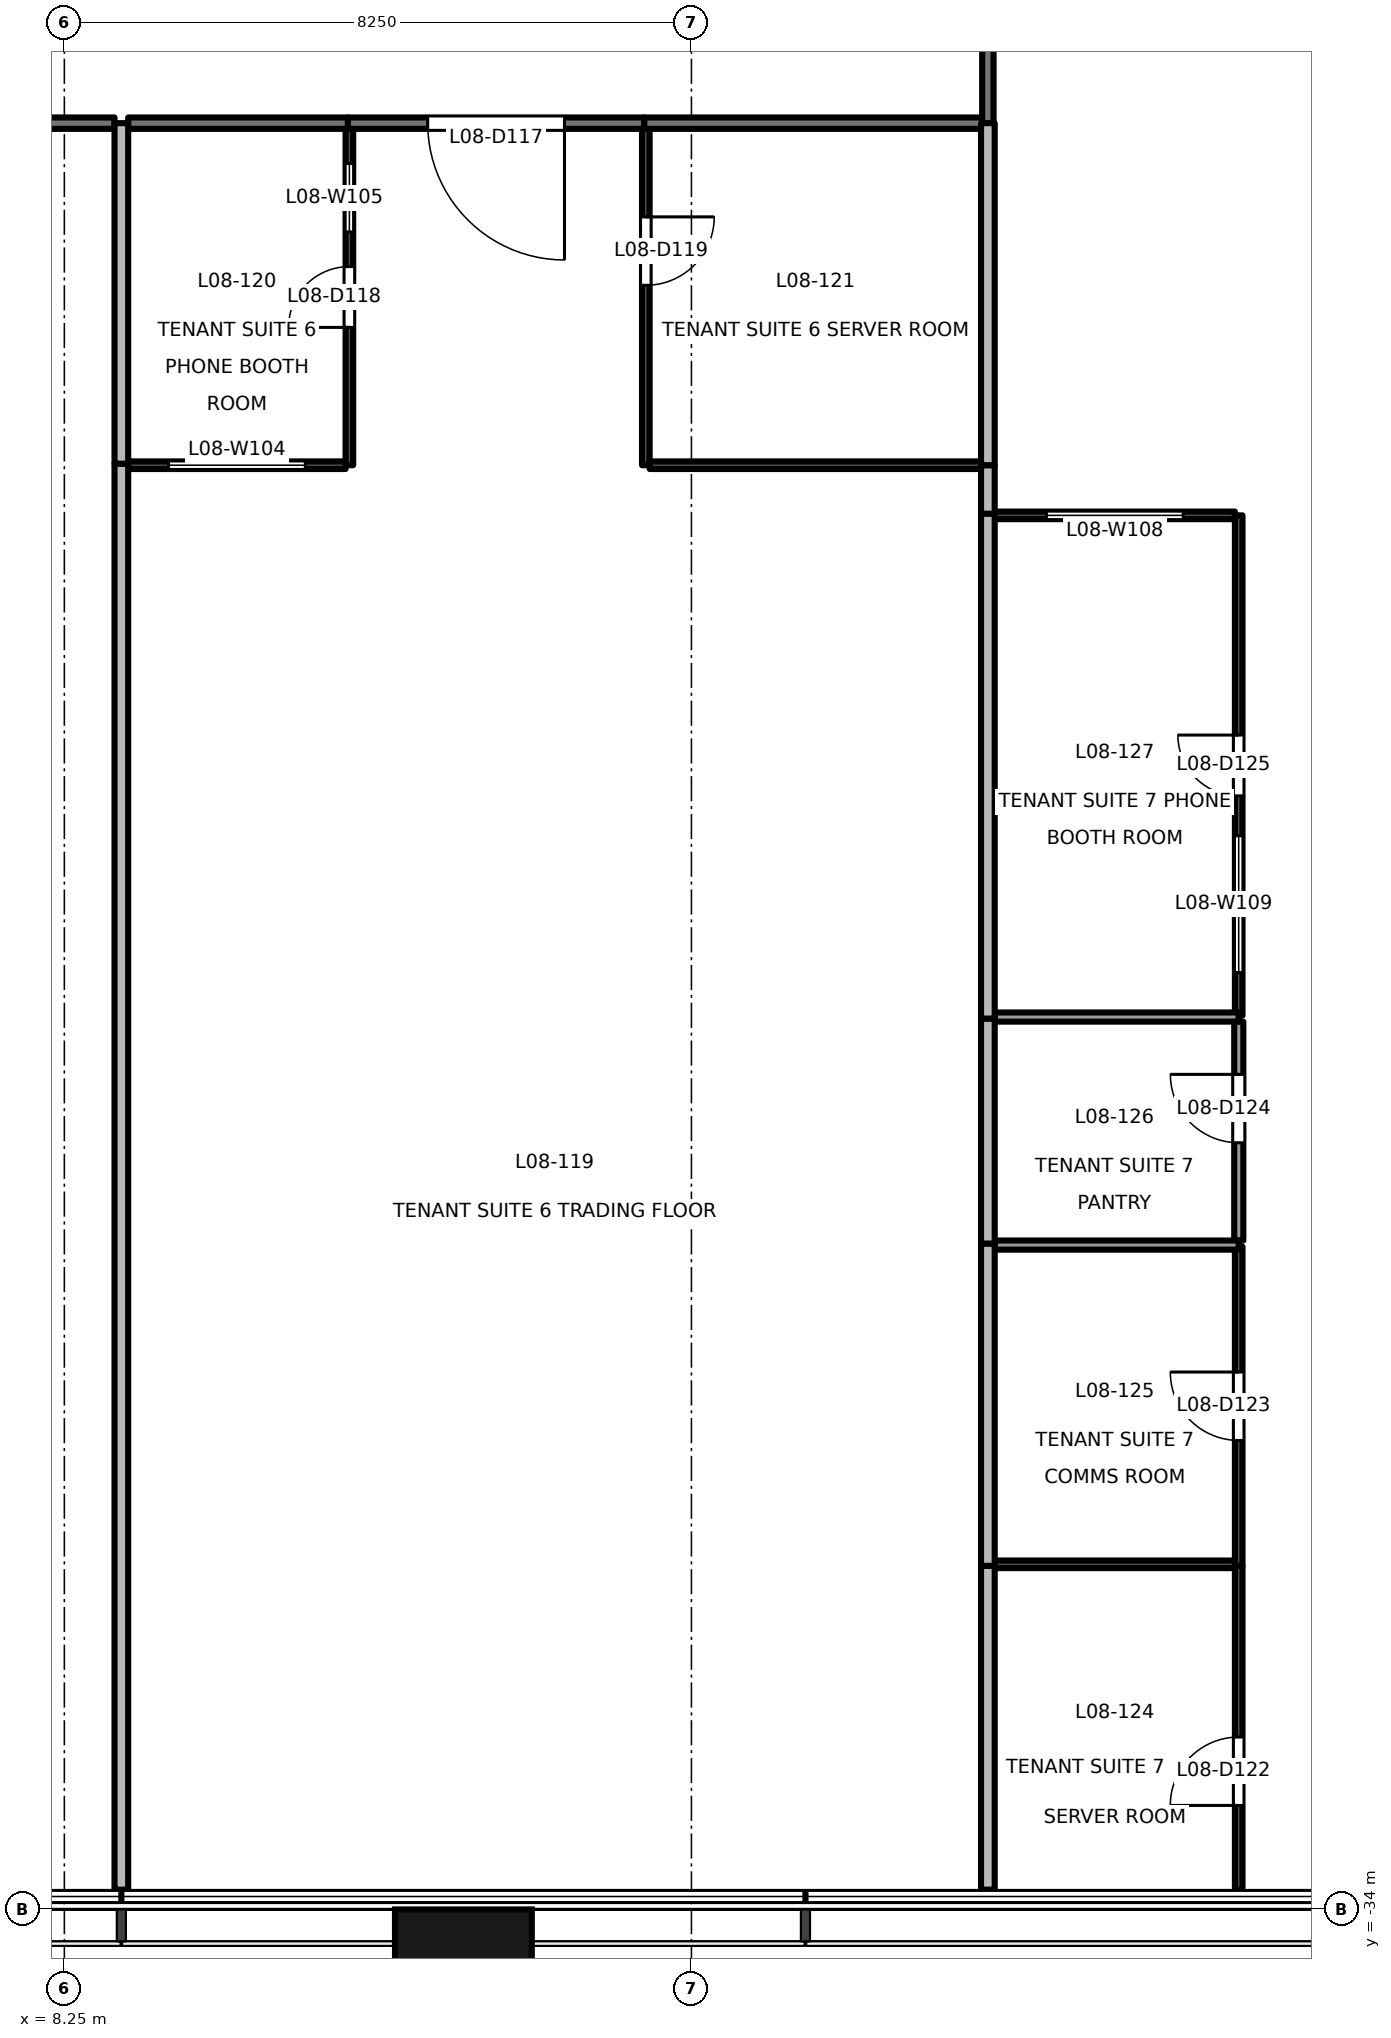
"""IFC4 building model, lengths in metres.
Left out: names, types, materials, properties, quantities, classifications, styles, units other than length and angle.
Written with IfcOpenShell. Run it as: python <this file> out.ifc"""

import sys

from ifc_helpers import new_model, si_unit, direction, frame, frame_2d, origin, origin_2d, place, context, subcontext, project, spatial, rectangle, extrude, element, fill, save


model = new_model("IFC4")
c1 = context("Model", 3, precision=1e-05, world=origin(), true_north=direction((0.0, 1.0)))
c2 = subcontext(c1, "Body", "Model", "MODEL_VIEW")
j1 = project(units=[si_unit("LENGTHUNIT", "METRE"), si_unit("PLANEANGLEUNIT", "RADIAN")], contexts=[c1])
p1 = place(None, origin())
s1 = spatial("IfcSite", under=j1, at=p1, CompositionType="ELEMENT")
p2 = place(p1, origin())
s2 = spatial("IfcBuilding", under=s1, at=p2, CompositionType="ELEMENT")
p3 = place(p2, frame((0.0, 0.0, 40.6)))
s3 = spatial("IfcBuildingStorey", under=s2, at=p3, CompositionType="ELEMENT", Elevation=40.6)
p4 = place(p3, frame((13.5, -34.9, -0.2), z_axis=(0.0, 0.0, 1.0), x_axis=(1.0, 0.0, 0.0)))
e1 = element("IfcColumn", 1, at=p4, inside=s3, PredefinedType="COLUMN", context=c2, shape_type="SweptSolid", body=[
    extrude(rectangle(XDim=1.8, YDim=1.8, at=origin_2d()), origin(), (0.0, 0.0, 1.0), 4.1),
])
p5 = place(p3, frame((8.91, -10.5, 0.0), z_axis=(0.0, 0.0, 1.0), x_axis=(-1.0, 0.0, 0.0)))
e2 = element("IfcWall", 2, at=p5, inside=s3, PredefinedType="PARTITIONING", context=c2, shape_type="SweptSolid", body=[
    extrude(rectangle(XDim=5.93, YDim=0.15, at=frame_2d((2.965, 0.0))), origin(), (0.0, 0.0, 1.0), 2.9),
])
p6 = place(p5, frame((3.197, 0.0, 0.0)))
e3 = element("IfcOpeningElement", 3, at=p6, cuts=e2, PredefinedType="OPENING", context=c2, shape_type="SweptSolid", body=[
    extrude(rectangle(XDim=1.5, YDim=2.1, at=frame_2d((0.75, 1.05))), frame((0.0, 0.085, 0.0), z_axis=(0.0, -1.0, 0.0), x_axis=(1.0, 0.0, 0.0)), (0.0, 0.0, 1.0), 0.171),
])
p7 = place(p3, frame((15.88, -10.5, 0.0), z_axis=(0.0, 0.0, 1.0), x_axis=(-1.0, 0.0, 0.0)))
e4 = element("IfcWall", 4, at=p7, inside=s3, PredefinedType="PARTITIONING", context=c2, shape_type="SweptSolid", body=[
    extrude(rectangle(XDim=3.9, YDim=0.15, at=frame_2d((1.95, 0.0))), origin(), (0.0, 0.0, 1.0), 2.9),
])
p8 = place(p7, frame((1.05, 0.0, 0.0)))
e5 = element("IfcOpeningElement", 5, at=p8, cuts=e4, PredefinedType="OPENING", context=c2, shape_type="SweptSolid", body=[
    extrude(rectangle(XDim=1.8, YDim=2.1, at=frame_2d((0.9, 1.05))), frame((0.0, 0.085, 0.0), z_axis=(0.0, -1.0, 0.0), x_axis=(1.0, 0.0, 0.0)), (0.0, 0.0, 1.0), 0.171),
])
p9 = place(p3, frame((11.98, -10.5, 0.0), z_axis=(0.0, 0.0, 1.0), x_axis=(-1.0, 0.0, 0.0)))
e6 = element("IfcWall", 6, at=p9, inside=s3, PredefinedType="PARTITIONING", context=c2, shape_type="SweptSolid", body=[
    extrude(rectangle(XDim=2.89, YDim=0.15, at=frame_2d((1.445, 0.0))), origin(), (0.0, 0.0, 1.0), 2.9),
])
p10 = place(p3, frame((20.325, -10.5, 0.0), z_axis=(0.0, 0.0, 1.0), x_axis=(-1.0, 0.0, 0.0)))
e7 = element("IfcWall", 7, at=p10, inside=s3, PredefinedType="PARTITIONING", context=c2, shape_type="SweptSolid", body=[
    extrude(rectangle(XDim=4.445, YDim=0.15, at=frame_2d((2.223, 0.0))), origin(), (0.0, 0.0, 1.0), 2.5),
])
p11 = place(p3, frame((20.4, -4.817, 0.0), z_axis=(0.0, 0.0, 1.0), x_axis=(0.0, -1.0, 0.0)))
e8 = element("IfcWall", 8, at=p11, inside=s3, PredefinedType="PARTITIONING", context=c2, shape_type="SweptSolid", body=[
    extrude(rectangle(XDim=5.683, YDim=0.15, at=frame_2d((2.842, 0.0))), origin(), (0.0, 0.0, 1.0), 3.3),
])
p12 = place(p11, frame((1.942, 0.0, 0.0)))
e9 = element("IfcOpeningElement", 9, at=p12, cuts=e8, PredefinedType="OPENING", context=c2, shape_type="SweptSolid", body=[
    extrude(rectangle(XDim=1.8, YDim=2.1, at=frame_2d((0.9, 1.05))), frame((0.0, 0.085, 0.0), z_axis=(0.0, -1.0, 0.0), x_axis=(1.0, 0.0, 0.0)), (0.0, 0.0, 1.0), 0.171),
])
p13 = place(p3, frame((9.0, -14.98, 0.0), z_axis=(0.0, 0.0, 1.0), x_axis=(0.0, -1.0, 0.0)))
e10 = element("IfcWall", 10, at=p13, inside=s3, PredefinedType="PARTITIONING", context=c2, shape_type="SweptSolid", body=[
    extrude(rectangle(XDim=18.76, YDim=0.18, at=frame_2d((9.38, 0.0))), origin(), (0.0, 0.0, 1.0), 2.9),
])
p14 = place(p3, frame((9.0, -10.5, 0.0), z_axis=(0.0, 0.0, 1.0), x_axis=(0.0, -1.0, 0.0)))
e11 = element("IfcWall", 11, at=p14, inside=s3, PredefinedType="PARTITIONING", context=c2, shape_type="SweptSolid", body=[
    extrude(rectangle(XDim=4.48, YDim=0.18, at=frame_2d((2.24, 0.0))), origin(), (0.0, 0.0, 1.0), 2.9),
])
p15 = place(p3, frame((9.09, -15.0, 0.0), z_axis=(0.0, 0.0, 1.0), x_axis=(1.0, 0.0, 0.0)))
e12 = element("IfcWall", 12, at=p15, inside=s3, PredefinedType="PARTITIONING", context=c2, shape_type="SweptSolid", body=[
    extrude(rectangle(XDim=2.86, YDim=0.1, at=frame_2d((1.43, 0.0))), origin(), (0.0, 0.0, 1.0), 2.9),
])
p16 = place(p15, frame((0.53, 0.0, 0.9)))
e13 = element("IfcOpeningElement", 13, at=p16, cuts=e12, PredefinedType="OPENING", context=c2, shape_type="SweptSolid", body=[
    extrude(rectangle(XDim=1.8, YDim=1.2, at=frame_2d((0.9, 0.6))), frame((0.0, 0.061, 0.0), z_axis=(0.0, -1.0, 0.0), x_axis=(1.0, 0.0, 0.0)), (0.0, 0.0, 1.0), 0.121),
])
p17 = place(p3, frame((12.0, -15.0, 0.0), z_axis=(0.0, 0.0, 1.0), x_axis=(0.0, 1.0, 0.0)))
e14 = element("IfcWall", 14, at=p17, inside=s3, PredefinedType="PARTITIONING", context=c2, shape_type="SweptSolid", body=[
    extrude(rectangle(XDim=4.425, YDim=0.1, at=frame_2d((2.212, 0.0))), origin(), (0.0, 0.0, 1.0), 3.9),
])
p18 = place(p17, frame((1.813, 0.0, 0.0)))
e15 = element("IfcOpeningElement", 15, at=p18, cuts=e14, PredefinedType="OPENING", context=c2, shape_type="SweptSolid", body=[
    extrude(rectangle(XDim=0.8, YDim=2.1, at=frame_2d((0.4, 1.05))), frame((0.0, 0.061, 0.0), z_axis=(0.0, -1.0, 0.0), x_axis=(1.0, 0.0, 0.0)), (0.0, 0.0, 1.0), 0.121),
])
p19 = place(p17, frame((3.069, 0.0, 0.9)))
e16 = element("IfcOpeningElement", 16, at=p19, cuts=e14, PredefinedType="OPENING", context=c2, shape_type="SweptSolid", body=[
    extrude(rectangle(XDim=0.9, YDim=1.2, at=frame_2d((0.45, 0.6))), frame((0.0, 0.061, 0.0), z_axis=(0.0, -1.0, 0.0), x_axis=(1.0, 0.0, 0.0)), (0.0, 0.0, 1.0), 0.121),
])
p20 = place(p3, frame((15.9, -10.575, 0.0), z_axis=(0.0, 0.0, 1.0), x_axis=(0.0, -1.0, 0.0)))
e17 = element("IfcWall", 17, at=p20, inside=s3, PredefinedType="PARTITIONING", context=c2, shape_type="SweptSolid", body=[
    extrude(rectangle(XDim=4.425, YDim=0.1, at=frame_2d((2.212, 0.0))), origin(), (0.0, 0.0, 1.0), 3.9),
])
p21 = place(p20, frame((1.158, 0.0, 0.0)))
e18 = element("IfcOpeningElement", 18, at=p21, cuts=e17, PredefinedType="OPENING", context=c2, shape_type="SweptSolid", body=[
    extrude(rectangle(XDim=0.9, YDim=2.1, at=frame_2d((0.45, 1.05))), frame((0.0, 0.061, 0.0), z_axis=(0.0, -1.0, 0.0), x_axis=(1.0, 0.0, 0.0)), (0.0, 0.0, 1.0), 0.121),
])
p22 = place(p3, frame((15.95, -15.0, 0.0), z_axis=(0.0, 0.0, 1.0), x_axis=(1.0, 0.0, 0.0)))
e19 = element("IfcWall", 19, at=p22, inside=s3, PredefinedType="PARTITIONING", context=c2, shape_type="SweptSolid", body=[
    extrude(rectangle(XDim=4.36, YDim=0.1, at=frame_2d((2.18, 0.0))), origin(), (0.0, 0.0, 1.0), 2.5),
])
p23 = place(p3, frame((20.4, -15.0, 0.0), z_axis=(0.0, 0.0, 1.0), x_axis=(0.0, -1.0, 0.0)))
e20 = element("IfcWall", 20, at=p23, inside=s3, PredefinedType="PARTITIONING", context=c2, shape_type="SweptSolid", body=[
    extrude(rectangle(XDim=0.64, YDim=0.18, at=frame_2d((0.32, 0.0))), origin(), (0.0, 0.0, 1.0), 3.9),
])
p24 = place(p3, frame((20.4, -29.48, 0.0), z_axis=(0.0, 0.0, 1.0), x_axis=(0.0, -1.0, 0.0)))
e21 = element("IfcWall", 21, at=p24, inside=s3, PredefinedType="PARTITIONING", context=c2, shape_type="SweptSolid", body=[
    extrude(rectangle(XDim=4.26, YDim=0.18, at=frame_2d((2.13, 0.0))), origin(), (0.0, 0.0, 1.0), 3.9),
])
p25 = place(p3, frame((20.4, -25.24, 0.0), z_axis=(0.0, 0.0, 1.0), x_axis=(0.0, -1.0, 0.0)))
e22 = element("IfcWall", 22, at=p25, inside=s3, PredefinedType="PARTITIONING", context=c2, shape_type="SweptSolid", body=[
    extrude(rectangle(XDim=4.24, YDim=0.18, at=frame_2d((2.12, 0.0))), origin(), (0.0, 0.0, 1.0), 3.3),
])
p26 = place(p3, frame((20.4, -22.28, 0.0), z_axis=(0.0, 0.0, 1.0), x_axis=(0.0, -1.0, 0.0)))
e23 = element("IfcWall", 23, at=p26, inside=s3, PredefinedType="PARTITIONING", context=c2, shape_type="SweptSolid", body=[
    extrude(rectangle(XDim=2.96, YDim=0.18, at=frame_2d((1.48, 0.0))), origin(), (0.0, 0.0, 1.0), 3.3),
])
p27 = place(p3, frame((20.4, -15.64, 0.0), z_axis=(0.0, 0.0, 1.0), x_axis=(0.0, -1.0, 0.0)))
e24 = element("IfcWall", 24, at=p27, inside=s3, PredefinedType="PARTITIONING", context=c2, shape_type="SweptSolid", body=[
    extrude(rectangle(XDim=6.64, YDim=0.18, at=frame_2d((3.32, 0.0))), origin(), (0.0, 0.0, 1.0), 3.3),
])
p28 = place(p3, frame((20.4, -10.5, 0.0), z_axis=(0.0, 0.0, 1.0), x_axis=(0.0, -1.0, 0.0)))
e25 = element("IfcWall", 25, at=p28, inside=s3, PredefinedType="PARTITIONING", context=c2, shape_type="SweptSolid", body=[
    extrude(rectangle(XDim=4.5, YDim=0.18, at=frame_2d((2.25, 0.0))), origin(), (0.0, 0.0, 1.0), 3.3),
])
p29 = place(p3, frame((23.7, -33.74, 0.0), z_axis=(0.0, 0.0, 1.0), x_axis=(0.0, 1.0, 0.0)))
e26 = element("IfcWall", 26, at=p29, inside=s3, PredefinedType="PARTITIONING", context=c2, shape_type="SweptSolid", body=[
    extrude(rectangle(XDim=4.26, YDim=0.1, at=frame_2d((2.13, 0.0))), origin(), (0.0, 0.0, 1.0), 3.9),
])
p30 = place(p29, frame((1.108, 0.0, 0.0)))
e27 = element("IfcOpeningElement", 27, at=p30, cuts=e26, PredefinedType="OPENING", context=c2, shape_type="SweptSolid", body=[
    extrude(rectangle(XDim=0.9, YDim=2.1, at=frame_2d((0.45, 1.05))), frame((0.0, 0.061, 0.0), z_axis=(0.0, -1.0, 0.0), x_axis=(1.0, 0.0, 0.0)), (0.0, 0.0, 1.0), 0.121),
])
p31 = place(p3, frame((23.7, -29.48, 0.0), z_axis=(0.0, 0.0, 1.0), x_axis=(0.0, 1.0, 0.0)))
e28 = element("IfcWall", 28, at=p31, inside=s3, PredefinedType="PARTITIONING", context=c2, shape_type="SweptSolid", body=[
    extrude(rectangle(XDim=4.2, YDim=0.1, at=frame_2d((2.1, 0.0))), origin(), (0.0, 0.0, 1.0), 3.3),
])
p32 = place(p31, frame((1.65, 0.0, 0.0)))
e29 = element("IfcOpeningElement", 29, at=p32, cuts=e28, PredefinedType="OPENING", context=c2, shape_type="SweptSolid", body=[
    extrude(rectangle(XDim=0.9, YDim=2.1, at=frame_2d((0.45, 1.05))), frame((0.0, 0.061, 0.0), z_axis=(0.0, -1.0, 0.0), x_axis=(1.0, 0.0, 0.0)), (0.0, 0.0, 1.0), 0.121),
])
p33 = place(p3, frame((23.701, -25.2, 0.0), z_axis=(0.0, 0.0, 1.0), x_axis=(0.0, 1.0, 0.0)))
e30 = element("IfcWall", 30, at=p33, inside=s3, PredefinedType="PARTITIONING", context=c2, shape_type="SweptSolid", body=[
    extrude(rectangle(XDim=2.88, YDim=0.12, at=frame_2d((1.44, 0.0))), origin(), (0.0, 0.0, 1.0), 3.3),
])
p34 = place(p33, frame((1.286, 0.0, 0.0)))
e31 = element("IfcOpeningElement", 31, at=p34, cuts=e30, PredefinedType="OPENING", context=c2, shape_type="SweptSolid", body=[
    extrude(rectangle(XDim=0.9, YDim=2.1, at=frame_2d((0.45, 1.05))), frame((0.0, 0.071, 0.0), z_axis=(0.0, -1.0, 0.0), x_axis=(1.0, 0.0, 0.0)), (0.0, 0.0, 1.0), 0.141),
])
p35 = place(p3, frame((23.65, -15.66, 0.0), z_axis=(0.0, 0.0, 1.0), x_axis=(-1.0, 0.0, 0.0)))
e32 = element("IfcWall", 32, at=p35, inside=s3, PredefinedType="PARTITIONING", context=c2, shape_type="SweptSolid", body=[
    extrude(rectangle(XDim=3.16, YDim=0.1, at=frame_2d((1.58, 0.0))), origin(), (0.0, 0.0, 1.0), 3.9),
])
p36 = place(p35, frame((0.68, 0.0, 0.9)))
e33 = element("IfcOpeningElement", 33, at=p36, cuts=e32, PredefinedType="OPENING", context=c2, shape_type="SweptSolid", body=[
    extrude(rectangle(XDim=1.8, YDim=1.2, at=frame_2d((0.9, 0.6))), frame((0.0, 0.061, 0.0), z_axis=(0.0, -1.0, 0.0), x_axis=(1.0, 0.0, 0.0)), (0.0, 0.0, 1.0), 0.121),
])
p37 = place(p3, frame((23.7, -22.24, 0.0), z_axis=(0.0, 0.0, 1.0), x_axis=(0.0, 1.0, 0.0)))
e34 = element("IfcWall", 34, at=p37, inside=s3, PredefinedType="PARTITIONING", context=c2, shape_type="SweptSolid", body=[
    extrude(rectangle(XDim=6.58, YDim=0.1, at=frame_2d((3.29, 0.0))), origin(), (0.0, 0.0, 1.0), 3.3),
])
p38 = place(p37, frame((2.89, 0.0, 0.0)))
e35 = element("IfcOpeningElement", 35, at=p38, cuts=e34, PredefinedType="OPENING", context=c2, shape_type="SweptSolid", body=[
    extrude(rectangle(XDim=0.8, YDim=2.1, at=frame_2d((0.4, 1.05))), frame((0.0, 0.061, 0.0), z_axis=(0.0, -1.0, 0.0), x_axis=(1.0, 0.0, 0.0)), (0.0, 0.0, 1.0), 0.121),
])
p39 = place(p37, frame((0.565, 0.0, 0.9)))
e36 = element("IfcOpeningElement", 36, at=p39, cuts=e34, PredefinedType="OPENING", context=c2, shape_type="SweptSolid", body=[
    extrude(rectangle(XDim=1.8, YDim=1.2, at=frame_2d((0.9, 0.6))), frame((0.0, 0.061, 0.0), z_axis=(0.0, -1.0, 0.0), x_axis=(1.0, 0.0, 0.0)), (0.0, 0.0, 1.0), 0.121),
])
p40 = place(p3, frame((20.49, -29.46, 0.0), z_axis=(0.0, 0.0, 1.0), x_axis=(1.0, 0.0, 0.0)))
e37 = element("IfcWall", 37, at=p40, inside=s3, PredefinedType="PARTITIONING", context=c2, shape_type="SweptSolid", body=[
    extrude(rectangle(XDim=3.16, YDim=0.1, at=frame_2d((1.58, 0.0))), origin(), (0.0, 0.0, 1.0), 3.9),
])
for number, where, z_axis, x_axis in (
    (38, (20.49, -25.26, 0.0), (0.0, 0.0, 1.0), (1.0, 0.0, 0.0)),
    (39, (20.49, -22.26, 0.0), (0.0, 0.0, 1.0), (1.0, 0.0, 0.0)),
):
    element("IfcWall", number, at=place(p3, frame(where, z_axis=z_axis, x_axis=x_axis)), inside=s3, PredefinedType="PARTITIONING", context=c2, shape_type="SweptSolid", body=[
        extrude(rectangle(XDim=3.21, YDim=0.12, at=frame_2d((1.605, 0.0))), origin(), (0.0, 0.0, 1.0), 3.9),
    ])
p41 = place(p8, origin())
e40 = element("IfcDoor", 40, at=p41, inside=s3, OperationType="DOUBLE_DOOR_SINGLE_SWING", PredefinedType="DOOR", context=c2, shape_type="SweptSolid", body=[
    extrude(rectangle(XDim=1.8, YDim=2.1, at=frame_2d((0.9, 1.05))), frame((0.0, 0.025, 0.0), z_axis=(0.0, -1.0, 0.0), x_axis=(1.0, 0.0, 0.0)), (0.0, 0.0, 1.0), 0.05),
])
fill(e5, e40)
p42 = place(p18, origin())
e41 = element("IfcDoor", 41, at=p42, inside=s3, OperationType="SINGLE_SWING_LEFT", PredefinedType="DOOR", context=c2, shape_type="SweptSolid", body=[
    extrude(rectangle(XDim=0.8, YDim=2.1, at=frame_2d((0.4, 1.05))), frame((0.0, 0.025, 0.0), z_axis=(0.0, -1.0, 0.0), x_axis=(1.0, 0.0, 0.0)), (0.0, 0.0, 1.0), 0.05),
])
fill(e15, e41)
p43 = place(p21, origin())
e42 = element("IfcDoor", 42, at=p43, inside=s3, OperationType="SINGLE_SWING_LEFT", PredefinedType="DOOR", context=c2, shape_type="SweptSolid", body=[
    extrude(rectangle(XDim=0.9, YDim=2.1, at=frame_2d((0.45, 1.05))), frame((0.0, 0.025, 0.0), z_axis=(0.0, -1.0, 0.0), x_axis=(1.0, 0.0, 0.0)), (0.0, 0.0, 1.0), 0.05),
])
fill(e18, e42)
p44 = place(p30, origin())
e43 = element("IfcDoor", 43, at=p44, inside=s3, OperationType="SINGLE_SWING_LEFT", PredefinedType="DOOR", context=c2, shape_type="SweptSolid", body=[
    extrude(rectangle(XDim=0.9, YDim=2.1, at=frame_2d((0.45, 1.05))), frame((0.0, 0.025, 0.0), z_axis=(0.0, -1.0, 0.0), x_axis=(1.0, 0.0, 0.0)), (0.0, 0.0, 1.0), 0.05),
])
fill(e27, e43)
p45 = place(p32, origin())
e44 = element("IfcDoor", 44, at=p45, inside=s3, OperationType="SINGLE_SWING_RIGHT", PredefinedType="DOOR", context=c2, shape_type="SweptSolid", body=[
    extrude(rectangle(XDim=0.9, YDim=2.1, at=frame_2d((0.45, 1.05))), frame((0.0, 0.025, 0.0), z_axis=(0.0, -1.0, 0.0), x_axis=(1.0, 0.0, 0.0)), (0.0, 0.0, 1.0), 0.05),
])
fill(e29, e44)
p46 = place(p34, origin())
e45 = element("IfcDoor", 45, at=p46, inside=s3, OperationType="SINGLE_SWING_RIGHT", PredefinedType="DOOR", context=c2, shape_type="SweptSolid", body=[
    extrude(rectangle(XDim=0.9, YDim=2.1, at=frame_2d((0.45, 1.05))), frame((0.0, 0.025, 0.0), z_axis=(0.0, -1.0, 0.0), x_axis=(1.0, 0.0, 0.0)), (0.0, 0.0, 1.0), 0.05),
])
fill(e31, e45)
p47 = place(p38, origin())
e46 = element("IfcDoor", 46, at=p47, inside=s3, OperationType="SINGLE_SWING_RIGHT", PredefinedType="DOOR", context=c2, shape_type="SweptSolid", body=[
    extrude(rectangle(XDim=0.8, YDim=2.1, at=frame_2d((0.4, 1.05))), frame((0.0, 0.025, 0.0), z_axis=(0.0, -1.0, 0.0), x_axis=(1.0, 0.0, 0.0)), (0.0, 0.0, 1.0), 0.05),
])
fill(e35, e46)
p48 = place(p16, origin())
e47 = element("IfcWindow", 47, at=p48, inside=s3, PartitioningType="SINGLE_PANEL", PredefinedType="WINDOW", context=c2, shape_type="SweptSolid", body=[
    extrude(rectangle(XDim=1.8, YDim=1.2, at=frame_2d((0.9, 0.6))), frame((0.0, 0.03, 0.0), z_axis=(0.0, -1.0, 0.0), x_axis=(1.0, 0.0, 0.0)), (0.0, 0.0, 1.0), 0.06),
])
fill(e13, e47)
p49 = place(p19, origin())
e48 = element("IfcWindow", 48, at=p49, inside=s3, PartitioningType="SINGLE_PANEL", PredefinedType="WINDOW", context=c2, shape_type="SweptSolid", body=[
    extrude(rectangle(XDim=0.9, YDim=1.2, at=frame_2d((0.45, 0.6))), frame((0.0, 0.03, 0.0), z_axis=(0.0, -1.0, 0.0), x_axis=(1.0, 0.0, 0.0)), (0.0, 0.0, 1.0), 0.06),
])
fill(e16, e48)
p50 = place(p36, origin())
e49 = element("IfcWindow", 49, at=p50, inside=s3, PartitioningType="SINGLE_PANEL", PredefinedType="WINDOW", context=c2, shape_type="SweptSolid", body=[
    extrude(rectangle(XDim=1.8, YDim=1.2, at=frame_2d((0.9, 0.6))), frame((0.0, 0.03, 0.0), z_axis=(0.0, -1.0, 0.0), x_axis=(1.0, 0.0, 0.0)), (0.0, 0.0, 1.0), 0.06),
])
fill(e33, e49)
p51 = place(p39, origin())
e50 = element("IfcWindow", 50, at=p51, inside=s3, PartitioningType="SINGLE_PANEL", PredefinedType="WINDOW", context=c2, shape_type="SweptSolid", body=[
    extrude(rectangle(XDim=1.8, YDim=1.2, at=frame_2d((0.9, 0.6))), frame((0.0, 0.03, 0.0), z_axis=(0.0, -1.0, 0.0), x_axis=(1.0, 0.0, 0.0)), (0.0, 0.0, 1.0), 0.06),
])
fill(e36, e50)
save(model, sys.argv[1])
